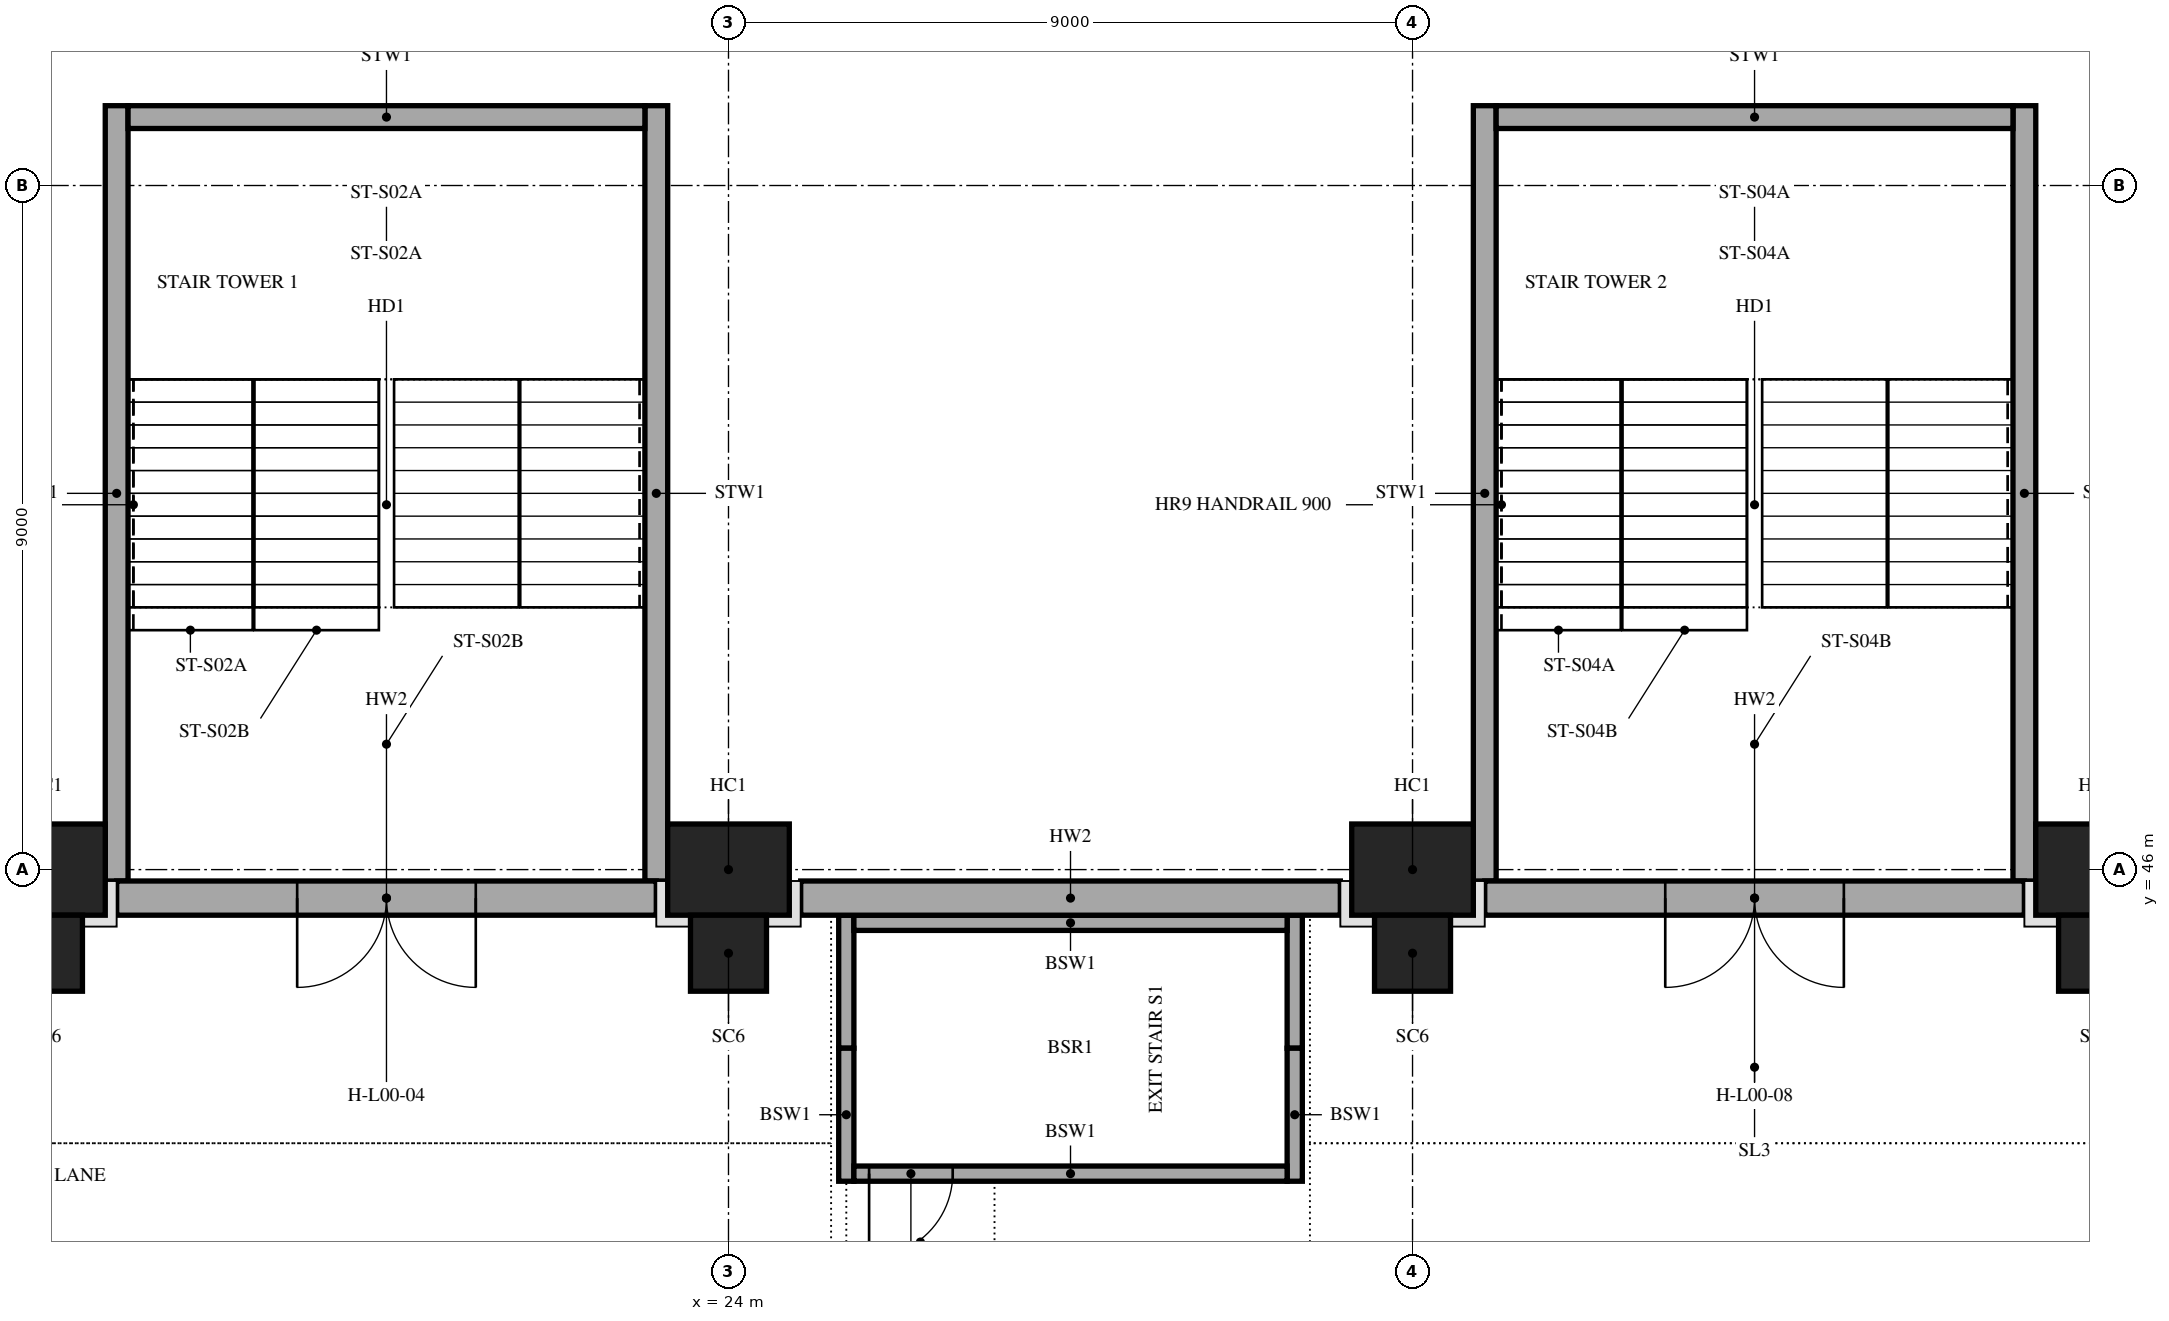
"""IFC4 building model, lengths in metres.
Left out: names, types, materials, properties, quantities, classifications, styles, units other than length and angle.
Written with IfcOpenShell. Run it as: python <this file> out.ifc"""

import sys

from ifc_helpers import new_model, si_unit, direction, frame, frame_2d, origin, origin_2d, place, context, subcontext, project, spatial, rectangle, extrude, element, fill, save


model = new_model("IFC4")
c1 = context("Model", 3, precision=1e-05, world=origin(), true_north=direction((0.0, 1.0)))
c2 = subcontext(c1, "Body", "Model", "MODEL_VIEW")
j1 = project(units=[si_unit("LENGTHUNIT", "METRE"), si_unit("PLANEANGLEUNIT", "RADIAN")], contexts=[c1])
p1 = place(None, origin())
s1 = spatial("IfcSite", under=j1, at=p1, CompositionType="ELEMENT")
p2 = place(p1, origin())
s2 = spatial("IfcBuilding", under=s1, at=p2, CompositionType="ELEMENT")
p3 = place(p2, origin())
s3 = spatial("IfcBuildingStorey", under=s2, at=p3, CompositionType="ELEMENT", Elevation=0.0)
for number, where, z_axis, x_axis in (
    (1, (15.0, 46.0, 0.0), (0.0, 0.0, 1.0), (1.0, 0.0, 0.0)),
    (2, (24.0, 46.0, 0.0), (0.0, 0.0, 1.0), (1.0, 0.0, 0.0)),
    (3, (33.0, 46.0, 0.0), (0.0, 0.0, 1.0), (1.0, 0.0, 0.0)),
    (4, (42.0, 46.0, 0.0), (0.0, 0.0, 1.0), (1.0, 0.0, 0.0)),
):
    element("IfcColumn", number, at=place(p3, frame(where, z_axis=z_axis, x_axis=x_axis)), inside=s3, PredefinedType="COLUMN", context=c2, shape_type="SweptSolid", body=[
        extrude(rectangle(XDim=1.6, YDim=1.2, at=origin_2d()), origin(), (0.0, 0.0, 1.0), 5.0),
    ])
for number, where, z_axis, x_axis in (
    (5, (15.95, 45.85, 0.0), (0.0, 0.0, 1.0), (0.0, 1.0, 0.0)),
    (6, (23.05, 45.85, 0.0), (0.0, 0.0, 1.0), (0.0, 1.0, 0.0)),
):
    element("IfcWall", number, at=place(p3, frame(where, z_axis=z_axis, x_axis=x_axis)), inside=s3, PredefinedType="SHEAR", context=c2, shape_type="SweptSolid", body=[
        extrude(rectangle(XDim=10.2, YDim=0.3, at=frame_2d((5.1, 0.0))), origin(), (0.0, 0.0, 1.0), 5.0),
    ])
p4 = place(p3, frame((16.1, 55.9, 0.0), z_axis=(0.0, 0.0, 1.0), x_axis=(1.0, 0.0, 0.0)))
e7 = element("IfcWall", 7, at=p4, inside=s3, PredefinedType="SHEAR", context=c2, shape_type="SweptSolid", body=[
    extrude(rectangle(XDim=6.8, YDim=0.3, at=frame_2d((3.4, 0.0))), origin(), (0.0, 0.0, 1.0), 5.0),
])
for number, where, z_axis, x_axis in (
    (8, (33.95, 45.85, 0.0), (0.0, 0.0, 1.0), (0.0, 1.0, 0.0)),
    (9, (41.05, 45.85, 0.0), (0.0, 0.0, 1.0), (0.0, 1.0, 0.0)),
):
    element("IfcWall", number, at=place(p3, frame(where, z_axis=z_axis, x_axis=x_axis)), inside=s3, PredefinedType="SHEAR", context=c2, shape_type="SweptSolid", body=[
        extrude(rectangle(XDim=10.2, YDim=0.3, at=frame_2d((5.1, 0.0))), origin(), (0.0, 0.0, 1.0), 5.0),
    ])
p5 = place(p3, frame((34.1, 55.9, 0.0), z_axis=(0.0, 0.0, 1.0), x_axis=(1.0, 0.0, 0.0)))
e10 = element("IfcWall", 10, at=p5, inside=s3, PredefinedType="SHEAR", context=c2, shape_type="SweptSolid", body=[
    extrude(rectangle(XDim=6.8, YDim=0.3, at=frame_2d((3.4, 0.0))), origin(), (0.0, 0.0, 1.0), 5.0),
])
for number, where, z_axis, x_axis in (
    (11, (15.0, 44.9, -0.3), (0.0, 0.0, 1.0), (1.0, 0.0, 0.0)),
    (12, (24.0, 44.9, -0.3), (0.0, 0.0, 1.0), (1.0, 0.0, 0.0)),
    (13, (33.0, 44.9, -0.3), (0.0, 0.0, 1.0), (1.0, 0.0, 0.0)),
    (14, (42.0, 44.9, -0.3), (0.0, 0.0, 1.0), (1.0, 0.0, 0.0)),
):
    element("IfcColumn", number, at=place(p3, frame(where, z_axis=z_axis, x_axis=x_axis)), inside=s3, PredefinedType="COLUMN", context=c2, shape_type="SweptSolid", body=[
        extrude(rectangle(XDim=1.0, YDim=1.0, at=origin_2d()), origin(), (0.0, 0.0, 1.0), 5.3),
    ])
for number, where, z_axis, x_axis in (
    (15, (25.55, 45.4, 0.0), (0.0, 0.0, 1.0), (0.0, -1.0, 0.0)),
    (16, (25.55, 43.65, 0.0), (0.0, 0.0, 1.0), (0.0, -1.0, 0.0)),
    (17, (31.45, 45.4, 0.0), (0.0, 0.0, 1.0), (0.0, -1.0, 0.0)),
    (18, (31.45, 43.65, 0.0), (0.0, 0.0, 1.0), (0.0, -1.0, 0.0)),
):
    element("IfcWall", number, at=place(p3, frame(where, z_axis=z_axis, x_axis=x_axis)), inside=s3, PredefinedType="SOLIDWALL", context=c2, shape_type="SweptSolid", body=[
        extrude(rectangle(XDim=1.75, YDim=0.2, at=frame_2d((0.875, 0.0))), origin(), (0.0, 0.0, 1.0), 3.2),
    ])
p6 = place(p3, frame((25.65, 42.0, 0.0), z_axis=(0.0, 0.0, 1.0), x_axis=(1.0, 0.0, 0.0)))
e19 = element("IfcWall", 19, at=p6, inside=s3, PredefinedType="SOLIDWALL", context=c2, shape_type="SweptSolid", body=[
    extrude(rectangle(XDim=5.7, YDim=0.2, at=frame_2d((2.85, 0.0))), origin(), (0.0, 0.0, 1.0), 3.2),
])
p7 = place(p6, frame((0.2, 0.0, 0.0)))
e20 = element("IfcOpeningElement", 20, at=p7, cuts=e19, PredefinedType="OPENING", context=c2, shape_type="SweptSolid", body=[
    extrude(rectangle(XDim=1.1, YDim=2.1, at=frame_2d((0.55, 1.05))), frame((0.0, 0.11, 0.0), z_axis=(0.0, -1.0, 0.0), x_axis=(1.0, 0.0, 0.0)), (0.0, 0.0, 1.0), 0.22),
])
p8 = place(p3, frame((25.65, 45.3, 0.0), z_axis=(0.0, 0.0, 1.0), x_axis=(1.0, 0.0, 0.0)))
e21 = element("IfcWall", 21, at=p8, inside=s3, PredefinedType="SOLIDWALL", context=c2, shape_type="SweptSolid", body=[
    extrude(rectangle(XDim=5.7, YDim=0.2, at=frame_2d((2.85, 0.0))), origin(), (0.0, 0.0, 1.0), 3.2),
])
p9 = place(p3, frame((15.95, 45.625, 0.0), z_axis=(0.0, 0.0, 1.0), x_axis=(1.0, 0.0, 0.0)))
e22 = element("IfcWall", 22, at=p9, inside=s3, PredefinedType="SOLIDWALL", context=c2, shape_type="SweptSolid", body=[
    extrude(rectangle(XDim=7.1, YDim=0.45, at=frame_2d((3.55, 0.0))), origin(), (0.0, 0.0, 1.0), 5.0),
])
p10 = place(p9, frame((2.375, 0.0, 0.0)))
e23 = element("IfcOpeningElement", 23, at=p10, cuts=e22, PredefinedType="OPENING", context=c2, shape_type="SweptSolid", body=[
    extrude(rectangle(XDim=2.35, YDim=2.1, at=frame_2d((1.175, 1.05))), frame((0.0, 0.235, 0.0), z_axis=(0.0, -1.0, 0.0), x_axis=(1.0, 0.0, 0.0)), (0.0, 0.0, 1.0), 0.47),
])
p11 = place(p3, frame((24.95, 45.625, 0.0), z_axis=(0.0, 0.0, 1.0), x_axis=(1.0, 0.0, 0.0)))
e24 = element("IfcWall", 24, at=p11, inside=s3, PredefinedType="SOLIDWALL", context=c2, shape_type="SweptSolid", body=[
    extrude(rectangle(XDim=7.1, YDim=0.45, at=frame_2d((3.55, 0.0))), origin(), (0.0, 0.0, 1.0), 5.0),
])
p12 = place(p3, frame((33.95, 45.625, 0.0), z_axis=(0.0, 0.0, 1.0), x_axis=(1.0, 0.0, 0.0)))
e25 = element("IfcWall", 25, at=p12, inside=s3, PredefinedType="SOLIDWALL", context=c2, shape_type="SweptSolid", body=[
    extrude(rectangle(XDim=7.1, YDim=0.45, at=frame_2d((3.55, 0.0))), origin(), (0.0, 0.0, 1.0), 5.0),
])
p13 = place(p12, frame((2.375, 0.0, 0.0)))
e26 = element("IfcOpeningElement", 26, at=p13, cuts=e25, PredefinedType="OPENING", context=c2, shape_type="SweptSolid", body=[
    extrude(rectangle(XDim=2.35, YDim=2.1, at=frame_2d((1.175, 1.05))), frame((0.0, 0.235, 0.0), z_axis=(0.0, -1.0, 0.0), x_axis=(1.0, 0.0, 0.0)), (0.0, 0.0, 1.0), 0.47),
])
p14 = place(p7, frame((1.1, 0.0, 0.0), z_axis=(0.0, 0.0, 1.0), x_axis=(-1.0, 0.0, 0.0)))
e27 = element("IfcDoor", 27, at=p14, inside=s3, OperationType="SINGLE_SWING_RIGHT", PredefinedType="DOOR", context=c2, shape_type="SweptSolid", body=[
    extrude(rectangle(XDim=1.1, YDim=2.1, at=frame_2d((0.55, 1.05))), frame((0.0, 0.025, 0.0), z_axis=(0.0, -1.0, 0.0), x_axis=(1.0, 0.0, 0.0)), (0.0, 0.0, 1.0), 0.05),
])
fill(e20, e27)
p15 = place(p10, frame((2.35, 0.0, 0.0), z_axis=(0.0, 0.0, 1.0), x_axis=(-1.0, 0.0, 0.0)))
e28 = element("IfcDoor", 28, at=p15, inside=s3, OperationType="DOUBLE_DOOR_SINGLE_SWING", PredefinedType="DOOR", context=c2, shape_type="SweptSolid", body=[
    extrude(rectangle(XDim=2.35, YDim=2.1, at=frame_2d((1.175, 1.05))), frame((0.0, 0.025, 0.0), z_axis=(0.0, -1.0, 0.0), x_axis=(1.0, 0.0, 0.0)), (0.0, 0.0, 1.0), 0.05),
])
fill(e23, e28)
p16 = place(p13, frame((2.35, 0.0, 0.0), z_axis=(0.0, 0.0, 1.0), x_axis=(-1.0, 0.0, 0.0)))
e29 = element("IfcDoor", 29, at=p16, inside=s3, OperationType="DOUBLE_DOOR_SINGLE_SWING", PredefinedType="DOOR", context=c2, shape_type="SweptSolid", body=[
    extrude(rectangle(XDim=2.35, YDim=2.1, at=frame_2d((1.175, 1.05))), frame((0.0, 0.025, 0.0), z_axis=(0.0, -1.0, 0.0), x_axis=(1.0, 0.0, 0.0)), (0.0, 0.0, 1.0), 0.05),
])
fill(e26, e29)
save(model, sys.argv[1])
